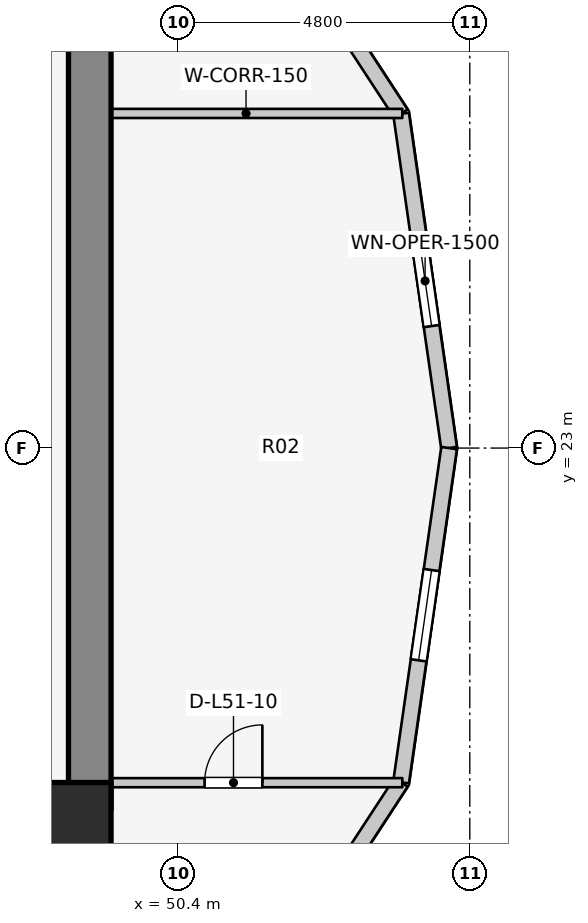
"""IFC4 building model, lengths in metres.
Left out: names, types, materials, properties, quantities, classifications, styles, units other than length and angle.
Written with IfcOpenShell. Run it as: python <this file> out.ifc"""

import sys

from ifc_helpers import new_model, si_unit, direction, frame, frame_2d, origin, origin_2d, place, context, subcontext, project, spatial, rectangle, extrude, element, fill, save


model = new_model("IFC4")
c1 = context("Model", 3, precision=1e-05, world=origin(), true_north=direction((0.0, 1.0)))
c2 = subcontext(c1, "Body", "Model", "MODEL_VIEW")
j1 = project(units=[si_unit("LENGTHUNIT", "METRE"), si_unit("PLANEANGLEUNIT", "RADIAN")], contexts=[c1])
p1 = place(None, origin())
s1 = spatial("IfcSite", under=j1, at=p1, CompositionType="ELEMENT")
p2 = place(p1, origin())
s2 = spatial("IfcBuilding", under=s1, at=p2, CompositionType="ELEMENT")
p3 = place(p2, frame((0.0, 0.0, 168.4)))
s3 = spatial("IfcBuildingStorey", under=s2, at=p3, CompositionType="ELEMENT", Elevation=168.4)
p4 = place(p3, frame((48.95, 17.05, 0.0), z_axis=(0.0, 0.0, 1.0), x_axis=(0.0, 1.0, 0.0)))
e1 = element("IfcWall", 1, at=p4, inside=s3, PredefinedType="SHEAR", context=c2, shape_type="SweptSolid", body=[
    extrude(rectangle(XDim=12.8, YDim=0.7, at=frame_2d((6.4, 0.0))), origin(), (0.0, 0.0, 1.0), 3.1),
])
p5 = place(p3, frame((48.7, 16.9, 0.0), z_axis=(0.0, 0.0, 1.0), x_axis=(1.0, 0.0, 0.0)))
e2 = element("IfcColumn", 2, at=p5, inside=s3, PredefinedType="COLUMN", context=c2, shape_type="SweptSolid", body=[
    extrude(rectangle(XDim=1.2, YDim=1.2, at=origin_2d()), origin(), (0.0, 0.0, 1.0), 3.1),
])
p6 = place(p3, frame((54.86, 23.0, 0.0), z_axis=(0.0, 0.0, 1.0), x_axis=(-0.142227632286, 0.989833976288, 0.0)))
e3 = element("IfcWall", 3, at=p6, inside=s3, PredefinedType="STANDARD", context=c2, shape_type="SweptSolid", body=[
    extrude(rectangle(XDim=5.553, YDim=0.26, at=frame_2d((2.776, 0.0))), origin(), (0.0, 0.0, 1.0), 2.57),
])
p7 = place(p6, frame((2.027, 0.0, 0.75)))
e4 = element("IfcOpeningElement", 4, at=p7, cuts=e3, PredefinedType="OPENING", context=c2, shape_type="SweptSolid", body=[
    extrude(rectangle(XDim=1.5, YDim=1.6, at=frame_2d((0.75, 0.8))), frame((0.0, 0.14, 0.0), z_axis=(0.0, -1.0, 0.0), x_axis=(1.0, 0.0, 0.0)), (0.0, 0.0, 1.0), 0.28),
])
p8 = place(p3, frame((54.07, 28.497, 0.0), z_axis=(0.0, 0.0, 1.0), x_axis=(-0.547456494366, 0.836834145322, 0.0)))
e5 = element("IfcWall", 5, at=p8, inside=s3, PredefinedType="STANDARD", context=c2, shape_type="SweptSolid", body=[
    extrude(rectangle(XDim=4.477, YDim=0.26, at=frame_2d((2.239, 0.0))), origin(), (0.0, 0.0, 1.0), 1.22),
])
p9 = place(p8, frame((1.639, 0.0, 0.15)))
e6 = element("IfcOpeningElement", 6, at=p9, cuts=e5, PredefinedType="OPENING", context=c2, shape_type="SweptSolid", body=[
    extrude(rectangle(XDim=1.2, YDim=0.9, at=frame_2d((0.6, 0.45))), frame((0.0, 0.14, 0.0), z_axis=(0.0, -1.0, 0.0), x_axis=(1.0, 0.0, 0.0)), (0.0, 0.0, 1.0), 0.28),
])
p10 = place(p3, frame((51.619, 13.757, 0.0), z_axis=(0.0, 0.0, 1.0), x_axis=(0.547456494366, 0.836834145322, 0.0)))
e7 = element("IfcWall", 7, at=p10, inside=s3, PredefinedType="STANDARD", context=c2, shape_type="SweptSolid", body=[
    extrude(rectangle(XDim=4.477, YDim=0.26, at=frame_2d((2.239, 0.0))), origin(), (0.0, 0.0, 1.0), 1.22),
])
p11 = place(p10, frame((1.639, 0.0, 0.15)))
e8 = element("IfcOpeningElement", 8, at=p11, cuts=e7, PredefinedType="OPENING", context=c2, shape_type="SweptSolid", body=[
    extrude(rectangle(XDim=1.2, YDim=0.9, at=frame_2d((0.6, 0.45))), frame((0.0, 0.14, 0.0), z_axis=(0.0, -1.0, 0.0), x_axis=(1.0, 0.0, 0.0)), (0.0, 0.0, 1.0), 0.28),
])
p12 = place(p3, frame((54.07, 17.503, 0.0), z_axis=(0.0, 0.0, 1.0), x_axis=(0.142227632286, 0.989833976288, 0.0)))
e9 = element("IfcWall", 9, at=p12, inside=s3, PredefinedType="STANDARD", context=c2, shape_type="SweptSolid", body=[
    extrude(rectangle(XDim=5.553, YDim=0.26, at=frame_2d((2.776, 0.0))), origin(), (0.0, 0.0, 1.0), 2.57),
])
p13 = place(p12, frame((2.027, 0.0, 0.75)))
e10 = element("IfcOpeningElement", 10, at=p13, cuts=e9, PredefinedType="OPENING", context=c2, shape_type="SweptSolid", body=[
    extrude(rectangle(XDim=1.5, YDim=1.6, at=frame_2d((0.75, 0.8))), frame((0.0, 0.14, 0.0), z_axis=(0.0, -1.0, 0.0), x_axis=(1.0, 0.0, 0.0)), (0.0, 0.0, 1.0), 0.28),
])
p14 = place(p3, frame((48.95, 17.497, 0.0), z_axis=(0.0, 0.0, 1.0), x_axis=(1.0, 0.0, 0.0)))
e11 = element("IfcWall", 11, at=p14, inside=s3, PredefinedType="PARTITIONING", context=c2, shape_type="SweptSolid", body=[
    extrude(rectangle(XDim=5.14, YDim=0.15, at=frame_2d((2.57, 0.0))), origin(), (0.0, 0.0, 1.0), 2.575),
])
p15 = place(p14, frame((1.889, 0.0, 0.0)))
e12 = element("IfcOpeningElement", 12, at=p15, cuts=e11, PredefinedType="OPENING", context=c2, shape_type="SweptSolid", body=[
    extrude(rectangle(XDim=0.95, YDim=2.1, at=frame_2d((0.475, 1.05))), frame((0.0, 0.085, 0.0), z_axis=(0.0, -1.0, 0.0), x_axis=(1.0, 0.0, 0.0)), (0.0, 0.0, 1.0), 0.17),
])
p16 = place(p3, frame((48.95, 28.503, 0.0), z_axis=(0.0, 0.0, 1.0), x_axis=(1.0, 0.0, 0.0)))
e13 = element("IfcWall", 13, at=p16, inside=s3, PredefinedType="PARTITIONING", context=c2, shape_type="SweptSolid", body=[
    extrude(rectangle(XDim=5.14, YDim=0.15, at=frame_2d((2.57, 0.0))), origin(), (0.0, 0.0, 1.0), 2.575),
])
p17 = place(p7, origin())
e14 = element("IfcWindow", 14, at=p17, inside=s3, PartitioningType="SINGLE_PANEL", PredefinedType="WINDOW", context=c2, shape_type="SweptSolid", body=[
    extrude(rectangle(XDim=1.5, YDim=1.6, at=frame_2d((0.75, 0.8))), frame((0.0, 0.03, 0.0), z_axis=(0.0, -1.0, 0.0), x_axis=(1.0, 0.0, 0.0)), (0.0, 0.0, 1.0), 0.06),
])
fill(e4, e14)
p18 = place(p13, origin())
e15 = element("IfcWindow", 15, at=p18, inside=s3, PartitioningType="SINGLE_PANEL", PredefinedType="WINDOW", context=c2, shape_type="SweptSolid", body=[
    extrude(rectangle(XDim=1.5, YDim=1.6, at=frame_2d((0.75, 0.8))), frame((0.0, 0.03, 0.0), z_axis=(0.0, -1.0, 0.0), x_axis=(1.0, 0.0, 0.0)), (0.0, 0.0, 1.0), 0.06),
])
fill(e10, e15)
p19 = place(p15, origin())
e16 = element("IfcDoor", 16, at=p19, inside=s3, OperationType="SINGLE_SWING_RIGHT", PredefinedType="DOOR", context=c2, shape_type="SweptSolid", body=[
    extrude(rectangle(XDim=0.95, YDim=2.1, at=frame_2d((0.475, 1.05))), frame((0.0, 0.025, 0.0), z_axis=(0.0, -1.0, 0.0), x_axis=(1.0, 0.0, 0.0)), (0.0, 0.0, 1.0), 0.05),
])
fill(e12, e16)
save(model, sys.argv[1])
